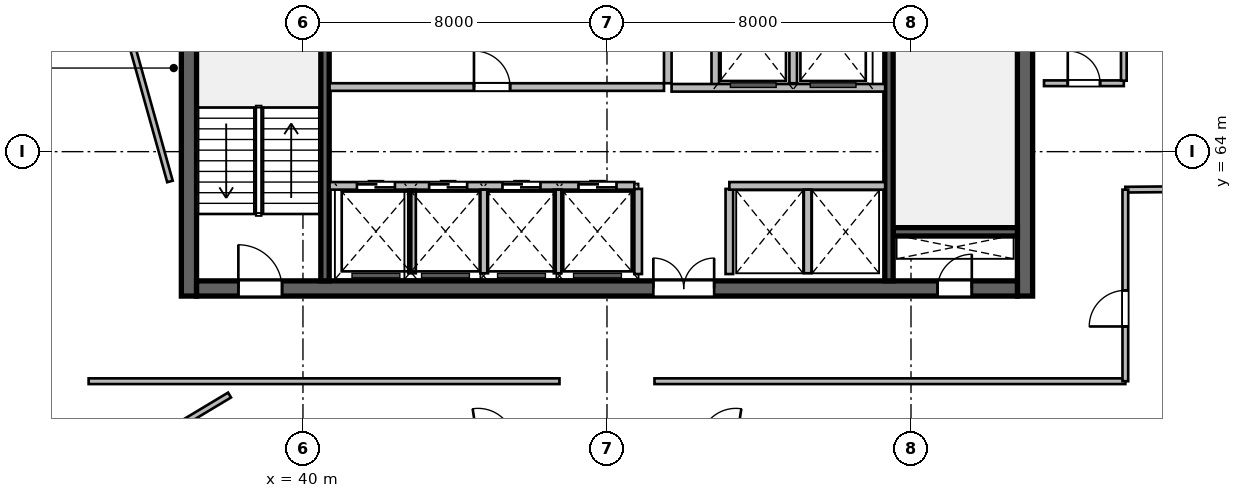
"""IFC4 building model, lengths in metres.
Left out: names, types, materials, properties, quantities, classifications, styles, units other than length and angle.
Written with IfcOpenShell. Run it as: python <this file> out.ifc"""

import sys

from ifc_helpers import new_model, si_unit, direction, frame, frame_2d, origin, place, context, subcontext, project, spatial, rectangle, extrude, source, transform, mapped, element, fill, save


model = new_model("IFC4")
c1 = context("Model", 3, precision=1e-05, world=origin(), true_north=direction((0.0, 1.0)))
c2 = subcontext(c1, "Body", "Model", "MODEL_VIEW")
j1 = project(units=[si_unit("LENGTHUNIT", "METRE"), si_unit("PLANEANGLEUNIT", "RADIAN")], contexts=[c1])
p1 = place(None, origin())
s1 = spatial("IfcSite", under=j1, at=p1, CompositionType="ELEMENT")
p2 = place(p1, origin())
s2 = spatial("IfcBuilding", under=s1, at=p2, CompositionType="ELEMENT")
p3 = place(p2, frame((0.0, 0.0, 271.8)))
s3 = spatial("IfcBuildingStorey", under=s2, at=p3, CompositionType="ELEMENT", Elevation=271.8)
m1 = source(origin(), c2, "Body", "SweptSolid", [
    extrude(rectangle(XDim=12.0, YDim=0.4, at=frame_2d((6.0, 0.0))), origin(), (0.0, 0.0, 1.0), 3.9),
])
for number, where, z_axis, x_axis in (
    (1, (37.0, 60.2, 0.0), (0.0, 0.0, 1.0), (0.0, 1.0, 0.0)),
    (2, (59.0, 60.2, 0.0), (0.0, 0.0, 1.0), (0.0, 1.0, 0.0)),
):
    element("IfcWall", number, at=place(p3, frame(where, z_axis=z_axis, x_axis=x_axis)), inside=s3, PredefinedType="SHEAR", context=c2, shape_type="MappedRepresentation", body=[
        mapped(m1, transform((0.0, 0.0, 0.0), scale=1.0)),
    ])
m2 = source(origin(), c2, "Body", "SweptSolid", [
    extrude(rectangle(XDim=21.6, YDim=0.4, at=frame_2d((10.8, 0.0))), origin(), (0.0, 0.0, 1.0), 3.9),
])
p4 = place(p3, frame((37.2, 60.4, 0.0), z_axis=(0.0, 0.0, 1.0), x_axis=(1.0, 0.0, 0.0)))
e3 = element("IfcWall", 3, at=p4, inside=s3, PredefinedType="SHEAR", context=c2, shape_type="MappedRepresentation", body=[
    mapped(m2, transform((0.0, 0.0, 0.0), scale=1.0)),
])
p5 = place(p4, frame((1.1, 0.0, 0.0)))
e4 = element("IfcOpeningElement", 4, at=p5, cuts=e3, PredefinedType="OPENING", context=c2, shape_type="SweptSolid", body=[
    extrude(rectangle(XDim=1.15, YDim=2.15, at=frame_2d((0.575, 1.075))), frame((0.0, 0.21, 0.0), z_axis=(0.0, -1.0, 0.0), x_axis=(1.0, 0.0, 0.0)), (0.0, 0.0, 1.0), 0.42),
])
p6 = place(p4, frame((19.5, 0.0, 0.0)))
e5 = element("IfcOpeningElement", 5, at=p6, cuts=e3, PredefinedType="OPENING", context=c2, shape_type="SweptSolid", body=[
    extrude(rectangle(XDim=0.9, YDim=2.1, at=frame_2d((0.45, 1.05))), frame((0.0, 0.21, 0.0), z_axis=(0.0, -1.0, 0.0), x_axis=(1.0, 0.0, 0.0)), (0.0, 0.0, 1.0), 0.42),
])
p7 = place(p4, frame((12.02, 0.0, 0.0)))
e6 = element("IfcOpeningElement", 6, at=p7, cuts=e3, PredefinedType="OPENING", context=c2, shape_type="SweptSolid", body=[
    extrude(rectangle(XDim=1.6, YDim=2.15, at=frame_2d((0.8, 1.075))), frame((0.0, 0.21, 0.0), z_axis=(0.0, -1.0, 0.0), x_axis=(1.0, 0.0, 0.0)), (0.0, 0.0, 1.0), 0.42),
])
m3 = source(origin(), c2, "Body", "SweptSolid", [
    extrude(rectangle(XDim=3.27, YDim=0.22, at=frame_2d((1.635, 0.0))), origin(), (0.0, 0.0, 1.0), 3.9),
])
p8 = place(p3, frame((55.53, 61.89, 0.0), z_axis=(0.0, 0.0, 1.0), x_axis=(1.0, 0.0, 0.0)))
e7 = element("IfcWall", 7, at=p8, inside=s3, PredefinedType="SHEAR", context=c2, shape_type="MappedRepresentation", body=[
    mapped(m3, transform((0.0, 0.0, 0.0), scale=1.0)),
])
m4 = source(origin(), c2, "Body", "SweptSolid", [
    extrude(rectangle(XDim=11.2, YDim=0.22, at=frame_2d((5.6, 0.0))), origin(), (0.0, 0.0, 1.0), 3.9),
])
p9 = place(p3, frame((40.58, 60.6, 0.0), z_axis=(0.0, 0.0, 1.0), x_axis=(0.0, 1.0, 0.0)))
e8 = element("IfcWall", 8, at=p9, inside=s3, PredefinedType="SHEAR", context=c2, shape_type="MappedRepresentation", body=[
    mapped(m4, transform((0.0, 0.0, 0.0), scale=1.0)),
])
p10 = place(p3, frame((55.42, 60.6, 0.0), z_axis=(0.0, 0.0, 1.0), x_axis=(0.0, 1.0, 0.0)))
e9 = element("IfcWall", 9, at=p10, inside=s3, PredefinedType="SHEAR", context=c2, shape_type="MappedRepresentation", body=[
    mapped(m4, transform((0.0, 0.0, 0.0), scale=1.0)),
])
p11 = place(p10, frame((9.645, 0.0, 0.0)))
e10 = element("IfcOpeningElement", 10, at=p11, cuts=e9, PredefinedType="OPENING", context=c2, shape_type="SweptSolid", body=[
    extrude(rectangle(XDim=1.15, YDim=2.15, at=frame_2d((0.575, 1.075))), frame((0.0, 0.12, 0.0), z_axis=(0.0, -1.0, 0.0), x_axis=(1.0, 0.0, 0.0)), (0.0, 0.0, 1.0), 0.24),
])
m5 = source(origin(), c2, "Body", "SweptSolid", [
    extrude(rectangle(XDim=2.24, YDim=0.2, at=frame_2d((1.12, 0.0))), origin(), (0.0, 0.0, 1.0), 3.64),
])
for number, where, z_axis, x_axis in (
    (11, (48.82, 60.78, 0.0), (0.0, 0.0, 1.0), (0.0, 1.0, 0.0)),
    (12, (51.22, 60.78, 0.0), (0.0, 0.0, 1.0), (0.0, 1.0, 0.0)),
):
    element("IfcWall", number, at=place(p3, frame(where, z_axis=z_axis, x_axis=x_axis)), inside=s3, PredefinedType="SOLIDWALL", context=c2, shape_type="MappedRepresentation", body=[
        mapped(m5, transform((0.0, 0.0, 0.0), scale=1.0)),
    ])
m6 = source(origin(), c2, "Body", "SweptSolid", [
    extrude(rectangle(XDim=5.8, YDim=0.2, at=frame_2d((2.9, 0.0))), origin(), (0.0, 0.0, 1.0), 3.64),
])
p12 = place(p3, frame((49.6, 65.8, 0.0), z_axis=(0.0, 0.0, 1.0), x_axis=(0.0, 1.0, 0.0)))
e13 = element("IfcWall", 13, at=p12, inside=s3, PredefinedType="SOLIDWALL", context=c2, shape_type="MappedRepresentation", body=[
    mapped(m6, transform((0.0, 0.0, 0.0), scale=1.0)),
])
m7 = source(origin(), c2, "Body", "SweptSolid", [
    extrude(rectangle(XDim=2.58, YDim=0.2, at=frame_2d((1.29, 0.0))), origin(), (0.0, 0.0, 1.0), 3.64),
])
p13 = place(p3, frame((50.85, 65.68, 0.0), z_axis=(0.0, 0.0, 1.0), x_axis=(0.0, 1.0, 0.0)))
e14 = element("IfcWall", 14, at=p13, inside=s3, PredefinedType="SOLIDWALL", context=c2, shape_type="MappedRepresentation", body=[
    mapped(m7, transform((0.0, 0.0, 0.0), scale=1.0)),
])
m8 = source(origin(), c2, "Body", "SweptSolid", [
    extrude(rectangle(XDim=2.4, YDim=0.2, at=frame_2d((1.2, 0.0))), origin(), (0.0, 0.0, 1.0), 3.64),
])
p14 = place(p3, frame((52.9, 65.8, 0.0), z_axis=(0.0, 0.0, 1.0), x_axis=(0.0, 1.0, 0.0)))
e15 = element("IfcWall", 15, at=p14, inside=s3, PredefinedType="SOLIDWALL", context=c2, shape_type="MappedRepresentation", body=[
    mapped(m8, transform((0.0, 0.0, 0.0), scale=1.0)),
])
m9 = source(origin(), c2, "Body", "SweptSolid", [
    extrude(rectangle(XDim=5.62, YDim=0.2, at=frame_2d((2.81, 0.0))), origin(), (0.0, 0.0, 1.0), 3.64),
])
p15 = place(p3, frame((49.7, 65.68, 0.0), z_axis=(0.0, 0.0, 1.0), x_axis=(1.0, 0.0, 0.0)))
e16 = element("IfcWall", 16, at=p15, inside=s3, PredefinedType="SOLIDWALL", context=c2, shape_type="MappedRepresentation", body=[
    mapped(m9, transform((0.0, 0.0, 0.0), scale=1.0)),
])
m10 = source(origin(), c2, "Body", "SweptSolid", [
    extrude(rectangle(XDim=8.02, YDim=0.2, at=frame_2d((4.01, 0.0))), origin(), (0.0, 0.0, 1.0), 3.64),
])
p16 = place(p3, frame((40.7, 63.1, 0.0), z_axis=(0.0, 0.0, 1.0), x_axis=(1.0, 0.0, 0.0)))
e17 = element("IfcWall", 17, at=p16, inside=s3, PredefinedType="SOLIDWALL", context=c2, shape_type="MappedRepresentation", body=[
    mapped(m10, transform((0.0, 0.0, 0.0), scale=1.0)),
])
p17 = place(p16, frame((0.72, 0.0, 0.0)))
e18 = element("IfcOpeningElement", 18, at=p17, cuts=e17, PredefinedType="OPENING", context=c2, shape_type="SweptSolid", body=[
    extrude(rectangle(XDim=1.0, YDim=2.15, at=frame_2d((0.5, 1.075))), frame((0.0, 0.11, 0.0), z_axis=(0.0, -1.0, 0.0), x_axis=(1.0, 0.0, 0.0)), (0.0, 0.0, 1.0), 0.22),
])
p18 = place(p16, frame((2.62, 0.0, 0.0)))
e19 = element("IfcOpeningElement", 19, at=p18, cuts=e17, PredefinedType="OPENING", context=c2, shape_type="SweptSolid", body=[
    extrude(rectangle(XDim=1.0, YDim=2.15, at=frame_2d((0.5, 1.075))), frame((0.0, 0.11, 0.0), z_axis=(0.0, -1.0, 0.0), x_axis=(1.0, 0.0, 0.0)), (0.0, 0.0, 1.0), 0.22),
])
p19 = place(p16, frame((4.55, 0.0, 0.0)))
e20 = element("IfcOpeningElement", 20, at=p19, cuts=e17, PredefinedType="OPENING", context=c2, shape_type="SweptSolid", body=[
    extrude(rectangle(XDim=1.0, YDim=2.15, at=frame_2d((0.5, 1.075))), frame((0.0, 0.11, 0.0), z_axis=(0.0, -1.0, 0.0), x_axis=(1.0, 0.0, 0.0)), (0.0, 0.0, 1.0), 0.22),
])
p20 = place(p16, frame((6.55, 0.0, 0.0)))
e21 = element("IfcOpeningElement", 21, at=p20, cuts=e17, PredefinedType="OPENING", context=c2, shape_type="SweptSolid", body=[
    extrude(rectangle(XDim=1.0, YDim=2.15, at=frame_2d((0.5, 1.075))), frame((0.0, 0.11, 0.0), z_axis=(0.0, -1.0, 0.0), x_axis=(1.0, 0.0, 0.0)), (0.0, 0.0, 1.0), 0.22),
])
m11 = source(origin(), c2, "Body", "SweptSolid", [
    extrude(rectangle(XDim=4.1, YDim=0.2, at=frame_2d((2.05, 0.0))), origin(), (0.0, 0.0, 1.0), 3.64),
])
p21 = place(p3, frame((51.22, 63.1, 0.0), z_axis=(0.0, 0.0, 1.0), x_axis=(1.0, 0.0, 0.0)))
e22 = element("IfcWall", 22, at=p21, inside=s3, PredefinedType="SOLIDWALL", context=c2, shape_type="MappedRepresentation", body=[
    mapped(m11, transform((0.0, 0.0, 0.0), scale=1.0)),
])
m12 = source(origin(), c2, "Body", "SweptSolid", [
    extrude(rectangle(XDim=2.2, YDim=0.2, at=frame_2d((1.1, 0.0))), origin(), (0.0, 0.0, 1.0), 3.64),
])
for number, where, z_axis, x_axis in (
    (23, (42.87, 60.8, 0.0), (0.0, 0.0, 1.0), (0.0, 1.0, 0.0)),
    (24, (44.77, 60.8, 0.0), (0.0, 0.0, 1.0), (0.0, 1.0, 0.0)),
    (25, (46.7, 60.8, 0.0), (0.0, 0.0, 1.0), (0.0, 1.0, 0.0)),
    (26, (53.28, 60.8, 0.0), (0.0, 0.0, 1.0), (0.0, 1.0, 0.0)),
):
    element("IfcWall", number, at=place(p3, frame(where, z_axis=z_axis, x_axis=x_axis)), inside=s3, PredefinedType="SOLIDWALL", context=c2, shape_type="MappedRepresentation", body=[
        mapped(m12, transform((0.0, 0.0, 0.0), scale=1.0)),
    ])
m13 = source(origin(), c2, "Body", "SweptSolid", [
    extrude(rectangle(XDim=8.8, YDim=0.2, at=frame_2d((4.4, 0.0))), origin(), (0.0, 0.0, 1.0), 3.64),
])
p22 = place(p3, frame((40.7, 65.7, 0.0), z_axis=(0.0, 0.0, 1.0), x_axis=(1.0, 0.0, 0.0)))
e27 = element("IfcWall", 27, at=p22, inside=s3, PredefinedType="SOLIDWALL", context=c2, shape_type="MappedRepresentation", body=[
    mapped(m13, transform((0.0, 0.0, 0.0), scale=1.0)),
])
p23 = place(p22, frame((3.8, 0.0, 0.0)))
e28 = element("IfcOpeningElement", 28, at=p23, cuts=e27, PredefinedType="OPENING", context=c2, shape_type="SweptSolid", body=[
    extrude(rectangle(XDim=0.95, YDim=2.15, at=frame_2d((0.475, 1.075))), frame((0.0, 0.11, 0.0), z_axis=(0.0, -1.0, 0.0), x_axis=(1.0, 0.0, 0.0)), (0.0, 0.0, 1.0), 0.22),
])
m14 = source(origin(), c2, "Body", "SweptSolid", [
    extrude(rectangle(XDim=2.1, YDim=0.15, at=frame_2d((1.05, 0.0))), origin(), (0.0, 0.0, 1.0), 3.64),
])
p24 = place(p3, frame((59.5, 65.8, 0.0), z_axis=(0.0, 0.0, 1.0), x_axis=(1.0, 0.0, 0.0)))
e29 = element("IfcWall", 29, at=p24, inside=s3, PredefinedType="PARTITIONING", context=c2, shape_type="MappedRepresentation", body=[
    mapped(m14, transform((0.0, 0.0, 0.0), scale=1.0)),
])
p25 = place(p24, frame((0.625, 0.0, 0.0)))
e30 = element("IfcOpeningElement", 30, at=p25, cuts=e29, PredefinedType="OPENING", context=c2, shape_type="SweptSolid", body=[
    extrude(rectangle(XDim=0.85, YDim=2.1, at=frame_2d((0.425, 1.05))), frame((0.0, 0.085, 0.0), z_axis=(0.0, -1.0, 0.0), x_axis=(1.0, 0.0, 0.0)), (0.0, 0.0, 1.0), 0.17),
])
m15 = source(origin(), c2, "Body", "SweptSolid", [
    extrude(rectangle(XDim=3.565, YDim=0.15, at=frame_2d((1.783, 0.0))), origin(), (0.0, 0.0, 1.0), 3.64),
])
p26 = place(p3, frame((61.6, 65.867, 0.0), z_axis=(0.0, 0.0, 1.0), x_axis=(0.0, 1.0, 0.0)))
e31 = element("IfcWall", 31, at=p26, inside=s3, PredefinedType="PARTITIONING", context=c2, shape_type="MappedRepresentation", body=[
    mapped(m15, transform((0.0, 0.0, 0.0), scale=1.0)),
])
p27 = place(p26, frame((0.88, 0.0, 0.0)))
e32 = element("IfcOpeningElement", 32, at=p27, cuts=e31, PredefinedType="OPENING", context=c2, shape_type="SweptSolid", body=[
    extrude(rectangle(XDim=0.95, YDim=2.1, at=frame_2d((0.475, 1.05))), frame((0.0, 0.085, 0.0), z_axis=(0.0, -1.0, 0.0), x_axis=(1.0, 0.0, 0.0)), (0.0, 0.0, 1.0), 0.17),
])
m16 = source(origin(), c2, "Body", "SweptSolid", [
    extrude(rectangle(XDim=3.817, YDim=0.15, at=frame_2d((1.909, 0.0))), origin(), (0.0, 0.0, 1.0), 3.64),
])
p28 = place(p3, frame((34.795, 55.632, 0.0), z_axis=(0.0, 0.0, 1.0), x_axis=(0.857453418218, 0.514561595522, 0.0)))
e33 = element("IfcWall", 33, at=p28, inside=s3, PredefinedType="PARTITIONING", context=c2, shape_type="MappedRepresentation", body=[
    mapped(m16, transform((0.0, 0.0, 0.0), scale=1.0)),
])
m17 = source(origin(), c2, "Body", "SweptSolid", [
    extrude(rectangle(XDim=12.909, YDim=0.15, at=frame_2d((6.454, 0.0))), origin(), (0.0, 0.0, 1.0), 3.64),
])
p29 = place(p3, frame((36.5, 63.216, 0.0), z_axis=(0.0, 0.0, 1.0), x_axis=(-0.268750817191, 0.963209737419, 0.0)))
e34 = element("IfcWall", 34, at=p29, inside=s3, PredefinedType="PARTITIONING", context=c2, shape_type="MappedRepresentation", body=[
    mapped(m17, transform((0.0, 0.0, 0.0), scale=1.0)),
])
m18 = source(origin(), c2, "Body", "SweptSolid", [
    extrude(rectangle(XDim=12.39, YDim=0.15, at=frame_2d((6.195, 0.0))), origin(), (0.0, 0.0, 1.0), 3.373),
])
for number, where, z_axis, x_axis in (
    (35, (34.36, 57.96, 0.0), (0.0, 0.0, 1.0), (1.0, 0.0, 0.0)),
    (36, (49.25, 57.96, 0.0), (0.0, 0.0, 1.0), (1.0, 0.0, 0.0)),
):
    element("IfcWall", number, at=place(p3, frame(where, z_axis=z_axis, x_axis=x_axis)), inside=s3, PredefinedType="PARTITIONING", context=c2, shape_type="MappedRepresentation", body=[
        mapped(m18, transform((0.0, 0.0, 0.0), scale=1.0)),
    ])
m19 = source(origin(), c2, "Body", "SweptSolid", [
    extrude(rectangle(XDim=13.147, YDim=0.15, at=frame_2d((6.574, 0.0))), origin(), (0.0, 0.0, 1.0), 3.64),
])
p30 = place(p3, frame((61.64, 63.0, 0.0), z_axis=(0.0, 0.0, 1.0), x_axis=(0.999960274322, 0.008913460448, 0.0)))
e37 = element("IfcWall", 37, at=p30, inside=s3, PredefinedType="PARTITIONING", context=c2, shape_type="MappedRepresentation", body=[
    mapped(m19, transform((0.0, 0.0, 0.0), scale=1.0)),
])
m20 = source(origin(), c2, "Body", "SweptSolid", [
    extrude(rectangle(XDim=5.04, YDim=0.15, at=frame_2d((2.52, 0.0))), origin(), (0.0, 0.0, 1.0), 3.64),
])
p31 = place(p3, frame((61.64, 57.96, 0.0), z_axis=(0.0, 0.0, 1.0), x_axis=(0.0, 1.0, 0.0)))
e38 = element("IfcWall", 38, at=p31, inside=s3, PredefinedType="PARTITIONING", context=c2, shape_type="MappedRepresentation", body=[
    mapped(m20, transform((0.0, 0.0, 0.0), scale=1.0)),
])
p32 = place(p31, frame((1.44, 0.0, 0.0)))
e39 = element("IfcOpeningElement", 39, at=p32, cuts=e38, PredefinedType="OPENING", context=c2, shape_type="SweptSolid", body=[
    extrude(rectangle(XDim=0.95, YDim=2.1, at=frame_2d((0.475, 1.05))), frame((0.0, 0.085, 0.0), z_axis=(0.0, -1.0, 0.0), x_axis=(1.0, 0.0, 0.0)), (0.0, 0.0, 1.0), 0.17),
])
m21 = source(origin(), c2, "Body", "SweptSolid", [
    extrude(rectangle(XDim=1.15, YDim=2.15, at=frame_2d((0.575, 1.075))), frame((0.0, 0.025, 0.0), z_axis=(0.0, -1.0, 0.0), x_axis=(1.0, 0.0, 0.0)), (0.0, 0.0, 1.0), 0.05),
])
p33 = place(p5, origin())
e40 = element("IfcDoor", 40, at=p33, inside=s3, OperationType="SINGLE_SWING_LEFT", PredefinedType="DOOR", context=c2, shape_type="MappedRepresentation", body=[
    mapped(m21, transform((0.0, 0.0, 0.0), scale=1.0)),
])
fill(e4, e40)
m22 = source(origin(), c2, "Body", "SweptSolid", [
    extrude(rectangle(XDim=0.9, YDim=2.1, at=frame_2d((0.45, 1.05))), frame((0.0, 0.025, 0.0), z_axis=(0.0, -1.0, 0.0), x_axis=(1.0, 0.0, 0.0)), (0.0, 0.0, 1.0), 0.05),
])
p34 = place(p6, origin())
e41 = element("IfcDoor", 41, at=p34, inside=s3, OperationType="SINGLE_SWING_RIGHT", PredefinedType="DOOR", context=c2, shape_type="MappedRepresentation", body=[
    mapped(m22, transform((0.0, 0.0, 0.0), scale=1.0)),
])
fill(e5, e41)
m23 = source(origin(), c2, "Body", "SweptSolid", [
    extrude(rectangle(XDim=1.6, YDim=2.15, at=frame_2d((0.8, 1.075))), frame((0.0, 0.025, 0.0), z_axis=(0.0, -1.0, 0.0), x_axis=(1.0, 0.0, 0.0)), (0.0, 0.0, 1.0), 0.05),
])
p35 = place(p7, origin())
e42 = element("IfcDoor", 42, at=p35, inside=s3, OperationType="DOUBLE_DOOR_SINGLE_SWING", PredefinedType="DOOR", context=c2, shape_type="MappedRepresentation", body=[
    mapped(m23, transform((0.0, 0.0, 0.0), scale=1.0)),
])
fill(e6, e42)
m24 = source(origin(), c2, "Body", "SweptSolid", [
    extrude(rectangle(XDim=1.0, YDim=2.15, at=frame_2d((0.5, 1.075))), frame((0.0, 0.025, 0.0), z_axis=(0.0, -1.0, 0.0), x_axis=(1.0, 0.0, 0.0)), (0.0, 0.0, 1.0), 0.05),
])
p36 = place(p17, origin())
e43 = element("IfcDoor", 43, at=p36, inside=s3, OperationType="DOUBLE_DOOR_SLIDING", PredefinedType="DOOR", context=c2, shape_type="MappedRepresentation", body=[
    mapped(m24, transform((0.0, 0.0, 0.0), scale=1.0)),
])
fill(e18, e43)
p37 = place(p18, origin())
e44 = element("IfcDoor", 44, at=p37, inside=s3, OperationType="DOUBLE_DOOR_SLIDING", PredefinedType="DOOR", context=c2, shape_type="MappedRepresentation", body=[
    mapped(m24, transform((0.0, 0.0, 0.0), scale=1.0)),
])
fill(e19, e44)
p38 = place(p19, origin())
e45 = element("IfcDoor", 45, at=p38, inside=s3, OperationType="DOUBLE_DOOR_SLIDING", PredefinedType="DOOR", context=c2, shape_type="MappedRepresentation", body=[
    mapped(m24, transform((0.0, 0.0, 0.0), scale=1.0)),
])
fill(e20, e45)
p39 = place(p20, origin())
e46 = element("IfcDoor", 46, at=p39, inside=s3, OperationType="DOUBLE_DOOR_SLIDING", PredefinedType="DOOR", context=c2, shape_type="MappedRepresentation", body=[
    mapped(m24, transform((0.0, 0.0, 0.0), scale=1.0)),
])
fill(e21, e46)
m25 = source(origin(), c2, "Body", "SweptSolid", [
    extrude(rectangle(XDim=0.95, YDim=2.15, at=frame_2d((0.475, 1.075))), frame((0.0, 0.025, 0.0), z_axis=(0.0, -1.0, 0.0), x_axis=(1.0, 0.0, 0.0)), (0.0, 0.0, 1.0), 0.05),
])
p40 = place(p23, origin())
e47 = element("IfcDoor", 47, at=p40, inside=s3, OperationType="SINGLE_SWING_LEFT", PredefinedType="DOOR", context=c2, shape_type="MappedRepresentation", body=[
    mapped(m25, transform((0.0, 0.0, 0.0), scale=1.0)),
])
fill(e28, e47)
m26 = source(origin(), c2, "Body", "SweptSolid", [
    extrude(rectangle(XDim=0.85, YDim=2.1, at=frame_2d((0.425, 1.05))), frame((0.0, 0.025, 0.0), z_axis=(0.0, -1.0, 0.0), x_axis=(1.0, 0.0, 0.0)), (0.0, 0.0, 1.0), 0.05),
])
p41 = place(p25, origin())
e48 = element("IfcDoor", 48, at=p41, inside=s3, OperationType="SINGLE_SWING_LEFT", PredefinedType="DOOR", context=c2, shape_type="MappedRepresentation", body=[
    mapped(m26, transform((0.0, 0.0, 0.0), scale=1.0)),
])
fill(e30, e48)
m27 = source(origin(), c2, "Body", "SweptSolid", [
    extrude(rectangle(XDim=0.95, YDim=2.1, at=frame_2d((0.475, 1.05))), frame((0.0, 0.025, 0.0), z_axis=(0.0, -1.0, 0.0), x_axis=(1.0, 0.0, 0.0)), (0.0, 0.0, 1.0), 0.05),
])
p42 = place(p32, origin())
e49 = element("IfcDoor", 49, at=p42, inside=s3, OperationType="SINGLE_SWING_LEFT", PredefinedType="DOOR", context=c2, shape_type="MappedRepresentation", body=[
    mapped(m27, transform((0.0, 0.0, 0.0), scale=1.0)),
])
fill(e39, e49)
save(model, sys.argv[1])
